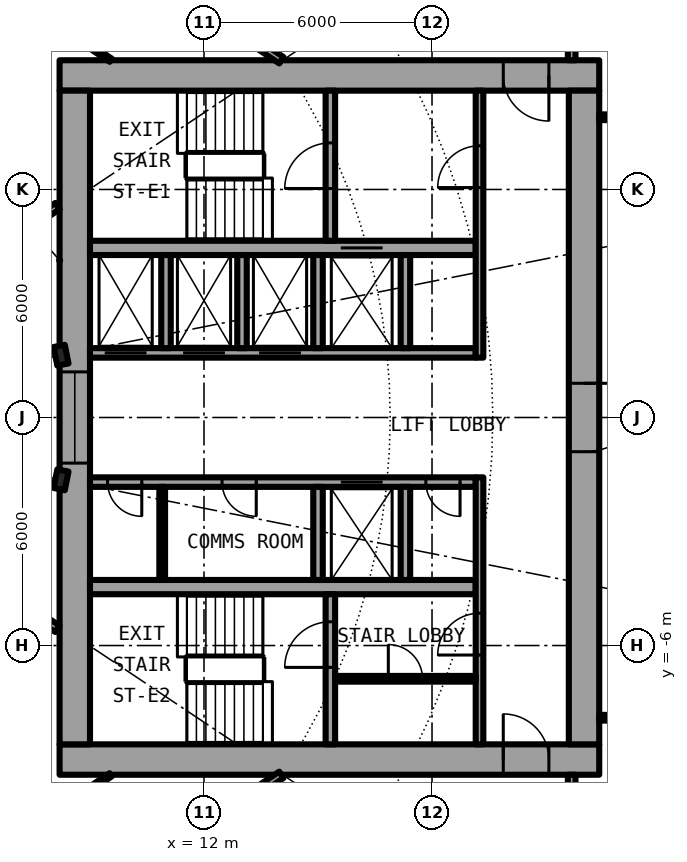
"""IFC4 building model, lengths in metres.
Left out: names, types, materials, properties, quantities, classifications, styles, units other than length and angle.
Written with IfcOpenShell. Run it as: python <this file> out.ifc"""

import sys

from ifc_helpers import new_model, si_unit, direction, frame, frame_2d, origin, origin_2d, place, context, subcontext, project, spatial, rectangle, i_section, extrude, element, fill, save


model = new_model("IFC4")
c1 = context("Model", 3, precision=1e-05, world=origin(), true_north=direction((0.0, 1.0)))
c2 = subcontext(c1, "Body", "Model", "MODEL_VIEW")
j1 = project(units=[si_unit("LENGTHUNIT", "METRE"), si_unit("PLANEANGLEUNIT", "RADIAN")], contexts=[c1])
p1 = place(None, origin())
s1 = spatial("IfcSite", under=j1, at=p1, CompositionType="ELEMENT")
p2 = place(p1, origin())
s2 = spatial("IfcBuilding", under=s1, at=p2, CompositionType="ELEMENT")
p3 = place(p2, frame((0.0, 0.0, 28.9)))
s3 = spatial("IfcBuildingStorey", under=s2, at=p3, CompositionType="ELEMENT", Elevation=28.9)
for number, where, z_axis, x_axis in (
    (1, (8.239, 1.639, 0.0), (0.0, 0.0, 1.0), (0.981, 0.195, 0.0)),
    (2, (8.239, -1.639, 0.0), (0.0, 0.0, 1.0), (0.981, -0.195, 0.0)),
):
    element("IfcColumn", number, at=place(p3, frame(where, z_axis=z_axis, x_axis=x_axis)), inside=s3, PredefinedType="COLUMN", context=c2, shape_type="SweptSolid", body=[
        extrude(i_section(OverallWidth=0.3, OverallDepth=0.5, WebThickness=0.014, FlangeThickness=0.028, FilletRadius=0.027, at=origin_2d()), origin(), (0.0, 0.0, 1.0), 3.05),
    ])
p4 = place(p3, frame((22.4, 9.0, 0.0), z_axis=(0.0, 0.0, 1.0), x_axis=(-1.0, 0.0, 0.0)))
e3 = element("IfcWall", 3, at=p4, inside=s3, PredefinedType="SHEAR", context=c2, shape_type="SweptSolid", body=[
    extrude(rectangle(XDim=14.2, YDim=0.8, at=frame_2d((7.1, 0.0))), origin(), (0.0, 0.0, 1.0), 3.05),
])
p5 = place(p4, frame((1.325, 0.0, 0.0)))
e4 = element("IfcOpeningElement", 4, at=p5, cuts=e3, PredefinedType="OPENING", context=c2, shape_type="SweptSolid", body=[
    extrude(rectangle(XDim=1.2, YDim=2.3, at=frame_2d((0.6, 1.15))), frame((0.0, 0.41, 0.0), z_axis=(0.0, -1.0, 0.0), x_axis=(1.0, 0.0, 0.0)), (0.0, 0.0, 1.0), 0.82),
])
p6 = place(p3, frame((8.2, -9.0, 0.0), z_axis=(0.0, 0.0, 1.0), x_axis=(1.0, 0.0, 0.0)))
e5 = element("IfcWall", 5, at=p6, inside=s3, PredefinedType="SHEAR", context=c2, shape_type="SweptSolid", body=[
    extrude(rectangle(XDim=14.2, YDim=0.8, at=frame_2d((7.1, 0.0))), origin(), (0.0, 0.0, 1.0), 3.05),
])
p7 = place(p6, frame((11.675, 0.0, 0.0)))
e6 = element("IfcOpeningElement", 6, at=p7, cuts=e5, PredefinedType="OPENING", context=c2, shape_type="SweptSolid", body=[
    extrude(rectangle(XDim=1.2, YDim=2.3, at=frame_2d((0.6, 1.15))), frame((0.0, 0.41, 0.0), z_axis=(0.0, -1.0, 0.0), x_axis=(1.0, 0.0, 0.0)), (0.0, 0.0, 1.0), 0.82),
])
p8 = place(p3, frame((22.0, 8.6, 0.0), z_axis=(0.0, 0.0, 1.0), x_axis=(0.0, -1.0, 0.0)))
e7 = element("IfcWall", 7, at=p8, inside=s3, PredefinedType="SHEAR", context=c2, shape_type="SweptSolid", body=[
    extrude(rectangle(XDim=17.2, YDim=0.8, at=frame_2d((8.6, 0.0))), origin(), (0.0, 0.0, 1.0), 3.05),
])
p9 = place(p8, frame((7.7, 0.0, 0.0)))
e8 = element("IfcOpeningElement", 8, at=p9, cuts=e7, PredefinedType="OPENING", context=c2, shape_type="SweptSolid", body=[
    extrude(rectangle(XDim=1.8, YDim=2.3, at=frame_2d((0.9, 1.15))), frame((0.0, 0.41, 0.0), z_axis=(0.0, -1.0, 0.0), x_axis=(1.0, 0.0, 0.0)), (0.0, 0.0, 1.0), 0.82),
])
p10 = place(p3, frame((8.6, -8.6, 0.0), z_axis=(0.0, 0.0, 1.0), x_axis=(0.0, 1.0, 0.0)))
e9 = element("IfcWall", 9, at=p10, inside=s3, PredefinedType="SHEAR", context=c2, shape_type="SweptSolid", body=[
    extrude(rectangle(XDim=17.2, YDim=0.8, at=frame_2d((8.6, 0.0))), origin(), (0.0, 0.0, 1.0), 3.05),
])
p11 = place(p10, frame((7.4, 0.0, 0.1)))
e10 = element("IfcOpeningElement", 10, at=p11, cuts=e9, PredefinedType="OPENING", context=c2, shape_type="SweptSolid", body=[
    extrude(rectangle(XDim=2.4, YDim=2.2, at=frame_2d((1.2, 1.1))), frame((0.0, 0.41, 0.0), z_axis=(0.0, -1.0, 0.0), x_axis=(1.0, 0.0, 0.0)), (0.0, 0.0, 1.0), 0.82),
])
p12 = place(p3, frame((9.0, 1.7, 0.0), z_axis=(0.0, 0.0, 1.0), x_axis=(1.0, 0.0, 0.0)))
e11 = element("IfcWall", 11, at=p12, inside=s3, PredefinedType="SHEAR", context=c2, shape_type="SweptSolid", body=[
    extrude(rectangle(XDim=10.15, YDim=0.25, at=frame_2d((5.075, 0.0))), origin(), (0.0, 0.0, 1.0), 3.05),
])
p13 = place(p12, frame((0.387, 0.0, 0.0)))
e12 = element("IfcOpeningElement", 12, at=p13, cuts=e11, PredefinedType="OPENING", context=c2, shape_type="SweptSolid", body=[
    extrude(rectangle(XDim=1.1, YDim=2.3, at=frame_2d((0.55, 1.15))), frame((0.0, 0.135, 0.0), z_axis=(0.0, -1.0, 0.0), x_axis=(1.0, 0.0, 0.0)), (0.0, 0.0, 1.0), 0.27),
])
p14 = place(p12, frame((2.45, 0.0, 0.0)))
e13 = element("IfcOpeningElement", 13, at=p14, cuts=e11, PredefinedType="OPENING", context=c2, shape_type="SweptSolid", body=[
    extrude(rectangle(XDim=1.1, YDim=2.3, at=frame_2d((0.55, 1.15))), frame((0.0, 0.135, 0.0), z_axis=(0.0, -1.0, 0.0), x_axis=(1.0, 0.0, 0.0)), (0.0, 0.0, 1.0), 0.27),
])
p15 = place(p12, frame((4.45, 0.0, 0.0)))
e14 = element("IfcOpeningElement", 14, at=p15, cuts=e11, PredefinedType="OPENING", context=c2, shape_type="SweptSolid", body=[
    extrude(rectangle(XDim=1.1, YDim=2.3, at=frame_2d((0.55, 1.15))), frame((0.0, 0.135, 0.0), z_axis=(0.0, -1.0, 0.0), x_axis=(1.0, 0.0, 0.0)), (0.0, 0.0, 1.0), 0.27),
])
p16 = place(p3, frame((9.0, 4.462, 0.0), z_axis=(0.0, 0.0, 1.0), x_axis=(1.0, 0.0, 0.0)))
e15 = element("IfcWall", 15, at=p16, inside=s3, PredefinedType="SHEAR", context=c2, shape_type="SweptSolid", body=[
    extrude(rectangle(XDim=10.15, YDim=0.375, at=frame_2d((5.075, 0.0))), origin(), (0.0, 0.0, 1.0), 3.05),
])
p17 = place(p16, frame((6.6, 0.0, 0.0)))
e16 = element("IfcOpeningElement", 16, at=p17, cuts=e15, PredefinedType="OPENING", context=c2, shape_type="SweptSolid", body=[
    extrude(rectangle(XDim=1.1, YDim=2.3, at=frame_2d((0.55, 1.15))), frame((0.0, 0.198, 0.0), z_axis=(0.0, -1.0, 0.0), x_axis=(1.0, 0.0, 0.0)), (0.0, 0.0, 1.0), 0.395),
])
p18 = place(p3, frame((15.325, 4.65, 0.0), z_axis=(0.0, 0.0, 1.0), x_axis=(0.0, 1.0, 0.0)))
e17 = element("IfcWall", 17, at=p18, inside=s3, PredefinedType="SHEAR", context=c2, shape_type="SweptSolid", body=[
    extrude(rectangle(XDim=3.95, YDim=0.25, at=frame_2d((1.975, 0.0))), origin(), (0.0, 0.0, 1.0), 3.05),
])
p19 = place(p18, frame((1.375, 0.0, 0.0)))
e18 = element("IfcOpeningElement", 18, at=p19, cuts=e17, PredefinedType="OPENING", context=c2, shape_type="SweptSolid", body=[
    extrude(rectangle(XDim=1.2, YDim=2.3, at=frame_2d((0.6, 1.15))), frame((0.0, 0.135, 0.0), z_axis=(0.0, -1.0, 0.0), x_axis=(1.0, 0.0, 0.0)), (0.0, 0.0, 1.0), 0.27),
])
for number, where, z_axis, x_axis in (
    (19, (15.0, 1.825, 0.0), (0.0, 0.0, 1.0), (0.0, 1.0, 0.0)),
    (20, (17.3, 1.825, 0.0), (0.0, 0.0, 1.0), (0.0, 1.0, 0.0)),
):
    element("IfcWall", number, at=place(p3, frame(where, z_axis=z_axis, x_axis=x_axis)), inside=s3, PredefinedType="SOLIDWALL", context=c2, shape_type="SweptSolid", body=[
        extrude(rectangle(XDim=2.45, YDim=0.25, at=frame_2d((1.225, 0.0))), origin(), (0.0, 0.0, 1.0), 2.7),
    ])
p20 = place(p3, frame((19.25, 1.575, 0.0), z_axis=(0.0, 0.0, 1.0), x_axis=(0.0, 1.0, 0.0)))
e21 = element("IfcWall", 21, at=p20, inside=s3, PredefinedType="SOLIDWALL", context=c2, shape_type="SweptSolid", body=[
    extrude(rectangle(XDim=7.025, YDim=0.2, at=frame_2d((3.513, 0.0))), origin(), (0.0, 0.0, 1.0), 2.7),
])
p21 = place(p20, frame((4.475, 0.0, 0.0)))
e22 = element("IfcOpeningElement", 22, at=p21, cuts=e21, PredefinedType="OPENING", context=c2, shape_type="SweptSolid", body=[
    extrude(rectangle(XDim=1.1, YDim=2.3, at=frame_2d((0.55, 1.15))), frame((0.0, 0.11, 0.0), z_axis=(0.0, -1.0, 0.0), x_axis=(1.0, 0.0, 0.0)), (0.0, 0.0, 1.0), 0.22),
])
p22 = place(p3, frame((19.15, -1.7, 0.0), z_axis=(0.0, 0.0, 1.0), x_axis=(-1.0, 0.0, 0.0)))
e23 = element("IfcWall", 23, at=p22, inside=s3, PredefinedType="SHEAR", context=c2, shape_type="SweptSolid", body=[
    extrude(rectangle(XDim=10.15, YDim=0.25, at=frame_2d((5.075, 0.0))), origin(), (0.0, 0.0, 1.0), 3.05),
])
p23 = place(p22, frame((2.45, 0.0, 0.0)))
e24 = element("IfcOpeningElement", 24, at=p23, cuts=e23, PredefinedType="OPENING", context=c2, shape_type="SweptSolid", body=[
    extrude(rectangle(XDim=1.1, YDim=2.3, at=frame_2d((0.55, 1.15))), frame((0.0, 0.135, 0.0), z_axis=(0.0, -1.0, 0.0), x_axis=(1.0, 0.0, 0.0)), (0.0, 0.0, 1.0), 0.27),
])
p24 = place(p22, frame((8.788, 0.0, 0.0)))
e25 = element("IfcOpeningElement", 25, at=p24, cuts=e23, PredefinedType="OPENING", context=c2, shape_type="SweptSolid", body=[
    extrude(rectangle(XDim=0.9, YDim=2.3, at=frame_2d((0.45, 1.15))), frame((0.0, 0.135, 0.0), z_axis=(0.0, -1.0, 0.0), x_axis=(1.0, 0.0, 0.0)), (0.0, 0.0, 1.0), 0.27),
])
p25 = place(p22, frame((5.775, 0.0, 0.0)))
e26 = element("IfcOpeningElement", 26, at=p25, cuts=e23, PredefinedType="OPENING", context=c2, shape_type="SweptSolid", body=[
    extrude(rectangle(XDim=0.9, YDim=2.3, at=frame_2d((0.45, 1.15))), frame((0.0, 0.135, 0.0), z_axis=(0.0, -1.0, 0.0), x_axis=(1.0, 0.0, 0.0)), (0.0, 0.0, 1.0), 0.27),
])
p26 = place(p22, frame((0.413, 0.0, 0.0)))
e27 = element("IfcOpeningElement", 27, at=p26, cuts=e23, PredefinedType="OPENING", context=c2, shape_type="SweptSolid", body=[
    extrude(rectangle(XDim=0.9, YDim=2.3, at=frame_2d((0.45, 1.15))), frame((0.0, 0.135, 0.0), z_axis=(0.0, -1.0, 0.0), x_axis=(1.0, 0.0, 0.0)), (0.0, 0.0, 1.0), 0.27),
])
p27 = place(p3, frame((9.0, -4.462, 0.0), z_axis=(0.0, 0.0, 1.0), x_axis=(1.0, 0.0, 0.0)))
e28 = element("IfcWall", 28, at=p27, inside=s3, PredefinedType="SHEAR", context=c2, shape_type="SweptSolid", body=[
    extrude(rectangle(XDim=10.15, YDim=0.375, at=frame_2d((5.075, 0.0))), origin(), (0.0, 0.0, 1.0), 3.05),
])
p28 = place(p3, frame((15.325, -8.6, 0.0), z_axis=(0.0, 0.0, 1.0), x_axis=(0.0, 1.0, 0.0)))
e29 = element("IfcWall", 29, at=p28, inside=s3, PredefinedType="SHEAR", context=c2, shape_type="SweptSolid", body=[
    extrude(rectangle(XDim=3.95, YDim=0.25, at=frame_2d((1.975, 0.0))), origin(), (0.0, 0.0, 1.0), 3.05),
])
p29 = place(p28, frame((2.025, 0.0, 0.0)))
e30 = element("IfcOpeningElement", 30, at=p29, cuts=e29, PredefinedType="OPENING", context=c2, shape_type="SweptSolid", body=[
    extrude(rectangle(XDim=1.2, YDim=2.3, at=frame_2d((0.6, 1.15))), frame((0.0, 0.135, 0.0), z_axis=(0.0, -1.0, 0.0), x_axis=(1.0, 0.0, 0.0)), (0.0, 0.0, 1.0), 0.27),
])
for number, where, z_axis, x_axis in (
    (31, (15.0, -1.825, 0.0), (0.0, 0.0, 1.0), (0.0, -1.0, 0.0)),
    (32, (17.3, -1.825, 0.0), (0.0, 0.0, 1.0), (0.0, -1.0, 0.0)),
):
    element("IfcWall", number, at=place(p3, frame(where, z_axis=z_axis, x_axis=x_axis)), inside=s3, PredefinedType="SOLIDWALL", context=c2, shape_type="SweptSolid", body=[
        extrude(rectangle(XDim=2.45, YDim=0.25, at=frame_2d((1.225, 0.0))), origin(), (0.0, 0.0, 1.0), 2.7),
    ])
p30 = place(p3, frame((19.25, -8.6, 0.0), z_axis=(0.0, 0.0, 1.0), x_axis=(0.0, 1.0, 0.0)))
e33 = element("IfcWall", 33, at=p30, inside=s3, PredefinedType="SOLIDWALL", context=c2, shape_type="SweptSolid", body=[
    extrude(rectangle(XDim=7.025, YDim=0.2, at=frame_2d((3.513, 0.0))), origin(), (0.0, 0.0, 1.0), 2.7),
])
p31 = place(p30, frame((2.35, 0.0, 0.0)))
e34 = element("IfcOpeningElement", 34, at=p31, cuts=e33, PredefinedType="OPENING", context=c2, shape_type="SweptSolid", body=[
    extrude(rectangle(XDim=1.1, YDim=2.3, at=frame_2d((0.55, 1.15))), frame((0.0, 0.11, 0.0), z_axis=(0.0, -1.0, 0.0), x_axis=(1.0, 0.0, 0.0)), (0.0, 0.0, 1.0), 0.22),
])
for number, where, z_axis, x_axis in (
    (35, (11.0, 1.825, 0.0), (0.0, 0.0, 1.0), (0.0, 1.0, 0.0)),
    (36, (13.0, 1.825, 0.0), (0.0, 0.0, 1.0), (0.0, 1.0, 0.0)),
):
    element("IfcWall", number, at=place(p3, frame(where, z_axis=z_axis, x_axis=x_axis)), inside=s3, PredefinedType="SOLIDWALL", context=c2, shape_type="SweptSolid", body=[
        extrude(rectangle(XDim=2.45, YDim=0.25, at=frame_2d((1.225, 0.0))), origin(), (0.0, 0.0, 1.0), 2.7),
    ])
p32 = place(p3, frame((10.9, -1.825, 0.0), z_axis=(0.0, 0.0, 1.0), x_axis=(0.0, -1.0, 0.0)))
e37 = element("IfcWall", 37, at=p32, inside=s3, PredefinedType="PARTITIONING", context=c2, shape_type="SweptSolid", body=[
    extrude(rectangle(XDim=2.45, YDim=0.15, at=frame_2d((1.225, 0.0))), origin(), (0.0, 0.0, 1.0), 2.7),
])
p33 = place(p3, frame((15.45, -6.875, 0.0), z_axis=(0.0, 0.0, 1.0), x_axis=(1.0, 0.0, 0.0)))
e38 = element("IfcWall", 38, at=p33, inside=s3, PredefinedType="PARTITIONING", context=c2, shape_type="SweptSolid", body=[
    extrude(rectangle(XDim=3.7, YDim=0.15, at=frame_2d((1.85, 0.0))), origin(), (0.0, 0.0, 1.0), 2.7),
])
p34 = place(p33, frame((1.4, 0.0, 0.0)))
e39 = element("IfcOpeningElement", 39, at=p34, cuts=e38, PredefinedType="OPENING", context=c2, shape_type="SweptSolid", body=[
    extrude(rectangle(XDim=0.9, YDim=2.3, at=frame_2d((0.45, 1.15))), frame((0.0, 0.085, 0.0), z_axis=(0.0, -1.0, 0.0), x_axis=(1.0, 0.0, 0.0)), (0.0, 0.0, 1.0), 0.17),
])
for number, where, z_axis, x_axis in (
    (40, (22.4, -7.9, 0.0), (0.0, 0.0, 1.0), (1.0, 0.0, 0.0)),
    (41, (22.4, 7.9, 0.0), (0.0, 0.0, 1.0), (1.0, 0.0, 0.0)),
):
    element("IfcWall", number, at=place(p3, frame(where, z_axis=z_axis, x_axis=x_axis)), inside=s3, PredefinedType="PARTITIONING", context=c2, shape_type="SweptSolid", body=[
        extrude(rectangle(XDim=2.54, YDim=0.15, at=frame_2d((1.27, 0.0))), origin(), (0.0, 0.0, 1.0), 2.7),
    ])
for number, where, z_axis, x_axis in (
    (42, (21.675, -11.0, 0.0), (0.0, 0.0, 1.0), (0.0, 1.0, 0.0)),
    (43, (21.675, 9.4, 0.0), (0.0, 0.0, 1.0), (0.0, 1.0, 0.0)),
):
    element("IfcWall", number, at=place(p3, frame(where, z_axis=z_axis, x_axis=x_axis)), inside=s3, PredefinedType="PARTITIONING", context=c2, shape_type="SweptSolid", body=[
        extrude(rectangle(XDim=1.6, YDim=0.2, at=frame_2d((0.8, 0.0))), origin(), (0.0, 0.0, 1.0), 2.7),
    ])
p35 = place(p3, frame((3.297, -16.575, 0.0), z_axis=(0.0, 0.0, 1.0), x_axis=(0.831561346449, 0.555432918625, 0.0)))
e44 = element("IfcWall", 44, at=p35, inside=s3, PredefinedType="PARTITIONING", context=c2, shape_type="SweptSolid", body=[
    extrude(rectangle(XDim=12.914, YDim=0.2, at=frame_2d((6.457, 0.0))), origin(), (0.0, 0.0, 1.0), 2.7),
])
p36 = place(p35, frame((4.352, 0.0, 0.0)))
e45 = element("IfcOpeningElement", 45, at=p36, cuts=e44, PredefinedType="OPENING", context=c2, shape_type="SweptSolid", body=[
    extrude(rectangle(XDim=1.0, YDim=2.3, at=frame_2d((0.5, 1.15))), frame((0.0, 0.11, 0.0), z_axis=(0.0, -1.0, 0.0), x_axis=(1.0, 0.0, 0.0)), (0.0, 0.0, 1.0), 0.22),
])
p37 = place(p3, frame((6.158, -11.664, 0.0), z_axis=(0.0, 0.0, 1.0), x_axis=(0.831459707426, 0.555585056429, 0.0)))
e46 = element("IfcWall", 46, at=p37, inside=s3, PredefinedType="PARTITIONING", context=c2, shape_type="SweptSolid", body=[
    extrude(rectangle(XDim=4.073, YDim=0.1, at=frame_2d((2.037, 0.0))), origin(), (0.0, 0.0, 1.0), 2.7),
])
for number, where, z_axis, x_axis in (
    (47, (6.513, -4.472, 0.0), (0.0, 0.0, 1.0), (0.831, -0.556, 0.0)),
    (48, (6.513, 4.472, 0.0), (0.0, 0.0, 1.0), (0.831, 0.556, 0.0)),
):
    element("IfcWall", number, at=place(p3, frame(where, z_axis=z_axis, x_axis=x_axis)), inside=s3, PredefinedType="PARTITIONING", context=c2, shape_type="SweptSolid", body=[
        extrude(rectangle(XDim=1.962, YDim=0.2, at=frame_2d((0.981, 0.0))), origin(), (0.0, 0.0, 1.0), 2.7),
    ])
p38 = place(p3, frame((6.159, 11.663, 0.0), z_axis=(0.0, 0.0, 1.0), x_axis=(0.831459707426, -0.555585056429, 0.0)))
e49 = element("IfcWall", 49, at=p38, inside=s3, PredefinedType="PARTITIONING", context=c2, shape_type="SweptSolid", body=[
    extrude(rectangle(XDim=4.073, YDim=0.1, at=frame_2d((2.037, 0.0))), origin(), (0.0, 0.0, 1.0), 2.7),
])
p39 = place(p3, frame((3.299, 16.574, 0.0), z_axis=(0.0, 0.0, 1.0), x_axis=(0.831465254975, -0.555576754166, 0.0)))
e50 = element("IfcWall", 50, at=p39, inside=s3, PredefinedType="PARTITIONING", context=c2, shape_type="SweptSolid", body=[
    extrude(rectangle(XDim=12.915, YDim=0.2, at=frame_2d((6.457, 0.0))), origin(), (0.0, 0.0, 1.0), 2.7),
])
p40 = place(p39, frame((4.346, 0.0, 0.0)))
e51 = element("IfcOpeningElement", 51, at=p40, cuts=e50, PredefinedType="OPENING", context=c2, shape_type="SweptSolid", body=[
    extrude(rectangle(XDim=1.0, YDim=2.3, at=frame_2d((0.5, 1.15))), frame((0.0, 0.11, 0.0), z_axis=(0.0, -1.0, 0.0), x_axis=(1.0, 0.0, 0.0)), (0.0, 0.0, 1.0), 0.22),
])
p41 = place(p13, origin())
e52 = element("IfcDoor", 52, at=p41, inside=s3, OperationType="DOUBLE_DOOR_SLIDING", PredefinedType="DOOR", context=c2, shape_type="SweptSolid", body=[
    extrude(rectangle(XDim=1.1, YDim=2.3, at=frame_2d((0.55, 1.15))), frame((0.0, 0.025, 0.0), z_axis=(0.0, -1.0, 0.0), x_axis=(1.0, 0.0, 0.0)), (0.0, 0.0, 1.0), 0.05),
])
fill(e12, e52)
p42 = place(p14, origin())
e53 = element("IfcDoor", 53, at=p42, inside=s3, OperationType="DOUBLE_DOOR_SLIDING", PredefinedType="DOOR", context=c2, shape_type="SweptSolid", body=[
    extrude(rectangle(XDim=1.1, YDim=2.3, at=frame_2d((0.55, 1.15))), frame((0.0, 0.025, 0.0), z_axis=(0.0, -1.0, 0.0), x_axis=(1.0, 0.0, 0.0)), (0.0, 0.0, 1.0), 0.05),
])
fill(e13, e53)
p43 = place(p15, origin())
e54 = element("IfcDoor", 54, at=p43, inside=s3, OperationType="DOUBLE_DOOR_SLIDING", PredefinedType="DOOR", context=c2, shape_type="SweptSolid", body=[
    extrude(rectangle(XDim=1.1, YDim=2.3, at=frame_2d((0.55, 1.15))), frame((0.0, 0.025, 0.0), z_axis=(0.0, -1.0, 0.0), x_axis=(1.0, 0.0, 0.0)), (0.0, 0.0, 1.0), 0.05),
])
fill(e14, e54)
p44 = place(p17, origin())
e55 = element("IfcDoor", 55, at=p44, inside=s3, OperationType="DOUBLE_DOOR_SLIDING", PredefinedType="DOOR", context=c2, shape_type="SweptSolid", body=[
    extrude(rectangle(XDim=1.1, YDim=2.3, at=frame_2d((0.55, 1.15))), frame((0.0, 0.025, 0.0), z_axis=(0.0, -1.0, 0.0), x_axis=(1.0, 0.0, 0.0)), (0.0, 0.0, 1.0), 0.05),
])
fill(e16, e55)
p45 = place(p23, origin())
e56 = element("IfcDoor", 56, at=p45, inside=s3, OperationType="DOUBLE_DOOR_SLIDING", PredefinedType="DOOR", context=c2, shape_type="SweptSolid", body=[
    extrude(rectangle(XDim=1.1, YDim=2.3, at=frame_2d((0.55, 1.15))), frame((0.0, 0.025, 0.0), z_axis=(0.0, -1.0, 0.0), x_axis=(1.0, 0.0, 0.0)), (0.0, 0.0, 1.0), 0.05),
])
fill(e24, e56)
p46 = place(p24, origin())
e57 = element("IfcDoor", 57, at=p46, inside=s3, OperationType="SINGLE_SWING_LEFT", PredefinedType="DOOR", context=c2, shape_type="SweptSolid", body=[
    extrude(rectangle(XDim=0.9, YDim=2.3, at=frame_2d((0.45, 1.15))), frame((0.0, 0.025, 0.0), z_axis=(0.0, -1.0, 0.0), x_axis=(1.0, 0.0, 0.0)), (0.0, 0.0, 1.0), 0.05),
])
fill(e25, e57)
p47 = place(p25, origin())
e58 = element("IfcDoor", 58, at=p47, inside=s3, OperationType="SINGLE_SWING_LEFT", PredefinedType="DOOR", context=c2, shape_type="SweptSolid", body=[
    extrude(rectangle(XDim=0.9, YDim=2.3, at=frame_2d((0.45, 1.15))), frame((0.0, 0.025, 0.0), z_axis=(0.0, -1.0, 0.0), x_axis=(1.0, 0.0, 0.0)), (0.0, 0.0, 1.0), 0.05),
])
fill(e26, e58)
p48 = place(p26, origin())
e59 = element("IfcDoor", 59, at=p48, inside=s3, OperationType="SINGLE_SWING_RIGHT", PredefinedType="DOOR", context=c2, shape_type="SweptSolid", body=[
    extrude(rectangle(XDim=0.9, YDim=2.3, at=frame_2d((0.45, 1.15))), frame((0.0, 0.025, 0.0), z_axis=(0.0, -1.0, 0.0), x_axis=(1.0, 0.0, 0.0)), (0.0, 0.0, 1.0), 0.05),
])
fill(e27, e59)
p49 = place(p34, origin())
e60 = element("IfcDoor", 60, at=p49, inside=s3, OperationType="SINGLE_SWING_LEFT", PredefinedType="DOOR", context=c2, shape_type="SweptSolid", body=[
    extrude(rectangle(XDim=0.9, YDim=2.3, at=frame_2d((0.45, 1.15))), frame((0.0, 0.025, 0.0), z_axis=(0.0, -1.0, 0.0), x_axis=(1.0, 0.0, 0.0)), (0.0, 0.0, 1.0), 0.05),
])
fill(e39, e60)
p50 = place(p19, origin())
e61 = element("IfcDoor", 61, at=p50, inside=s3, OperationType="SINGLE_SWING_LEFT", PredefinedType="DOOR", context=c2, shape_type="SweptSolid", body=[
    extrude(rectangle(XDim=1.2, YDim=2.3, at=frame_2d((0.6, 1.15))), frame((0.0, 0.025, 0.0), z_axis=(0.0, -1.0, 0.0), x_axis=(1.0, 0.0, 0.0)), (0.0, 0.0, 1.0), 0.05),
])
fill(e18, e61)
p51 = place(p29, origin())
e62 = element("IfcDoor", 62, at=p51, inside=s3, OperationType="SINGLE_SWING_LEFT", PredefinedType="DOOR", context=c2, shape_type="SweptSolid", body=[
    extrude(rectangle(XDim=1.2, YDim=2.3, at=frame_2d((0.6, 1.15))), frame((0.0, 0.025, 0.0), z_axis=(0.0, -1.0, 0.0), x_axis=(1.0, 0.0, 0.0)), (0.0, 0.0, 1.0), 0.05),
])
fill(e30, e62)
p52 = place(p21, origin())
e63 = element("IfcDoor", 63, at=p52, inside=s3, OperationType="SINGLE_SWING_LEFT", PredefinedType="DOOR", context=c2, shape_type="SweptSolid", body=[
    extrude(rectangle(XDim=1.1, YDim=2.3, at=frame_2d((0.55, 1.15))), frame((0.0, 0.025, 0.0), z_axis=(0.0, -1.0, 0.0), x_axis=(1.0, 0.0, 0.0)), (0.0, 0.0, 1.0), 0.05),
])
fill(e22, e63)
p53 = place(p31, origin())
e64 = element("IfcDoor", 64, at=p53, inside=s3, OperationType="SINGLE_SWING_RIGHT", PredefinedType="DOOR", context=c2, shape_type="SweptSolid", body=[
    extrude(rectangle(XDim=1.1, YDim=2.3, at=frame_2d((0.55, 1.15))), frame((0.0, 0.025, 0.0), z_axis=(0.0, -1.0, 0.0), x_axis=(1.0, 0.0, 0.0)), (0.0, 0.0, 1.0), 0.05),
])
fill(e34, e64)
p54 = place(p5, origin())
e65 = element("IfcDoor", 65, at=p54, inside=s3, OperationType="SINGLE_SWING_RIGHT", PredefinedType="DOOR", context=c2, shape_type="SweptSolid", body=[
    extrude(rectangle(XDim=1.2, YDim=2.3, at=frame_2d((0.6, 1.15))), frame((0.0, 0.025, 0.0), z_axis=(0.0, -1.0, 0.0), x_axis=(1.0, 0.0, 0.0)), (0.0, 0.0, 1.0), 0.05),
])
fill(e4, e65)
p55 = place(p7, origin())
e66 = element("IfcDoor", 66, at=p55, inside=s3, OperationType="SINGLE_SWING_LEFT", PredefinedType="DOOR", context=c2, shape_type="SweptSolid", body=[
    extrude(rectangle(XDim=1.2, YDim=2.3, at=frame_2d((0.6, 1.15))), frame((0.0, 0.025, 0.0), z_axis=(0.0, -1.0, 0.0), x_axis=(1.0, 0.0, 0.0)), (0.0, 0.0, 1.0), 0.05),
])
fill(e6, e66)
p56 = place(p9, origin())
e67 = element("IfcDoor", 67, at=p56, inside=s3, OperationType="SINGLE_SWING_LEFT", PredefinedType="DOOR", context=c2, shape_type="SweptSolid", body=[
    extrude(rectangle(XDim=1.8, YDim=2.3, at=frame_2d((0.9, 1.15))), frame((0.0, 0.025, 0.0), z_axis=(0.0, -1.0, 0.0), x_axis=(1.0, 0.0, 0.0)), (0.0, 0.0, 1.0), 0.05),
])
fill(e8, e67)
p57 = place(p11, origin())
e68 = element("IfcWindow", 68, at=p57, inside=s3, PartitioningType="SINGLE_PANEL", PredefinedType="WINDOW", context=c2, shape_type="SweptSolid", body=[
    extrude(rectangle(XDim=2.4, YDim=2.2, at=frame_2d((1.2, 1.1))), frame((0.0, 0.03, 0.0), z_axis=(0.0, -1.0, 0.0), x_axis=(1.0, 0.0, 0.0)), (0.0, 0.0, 1.0), 0.06),
])
fill(e10, e68)
save(model, sys.argv[1])
